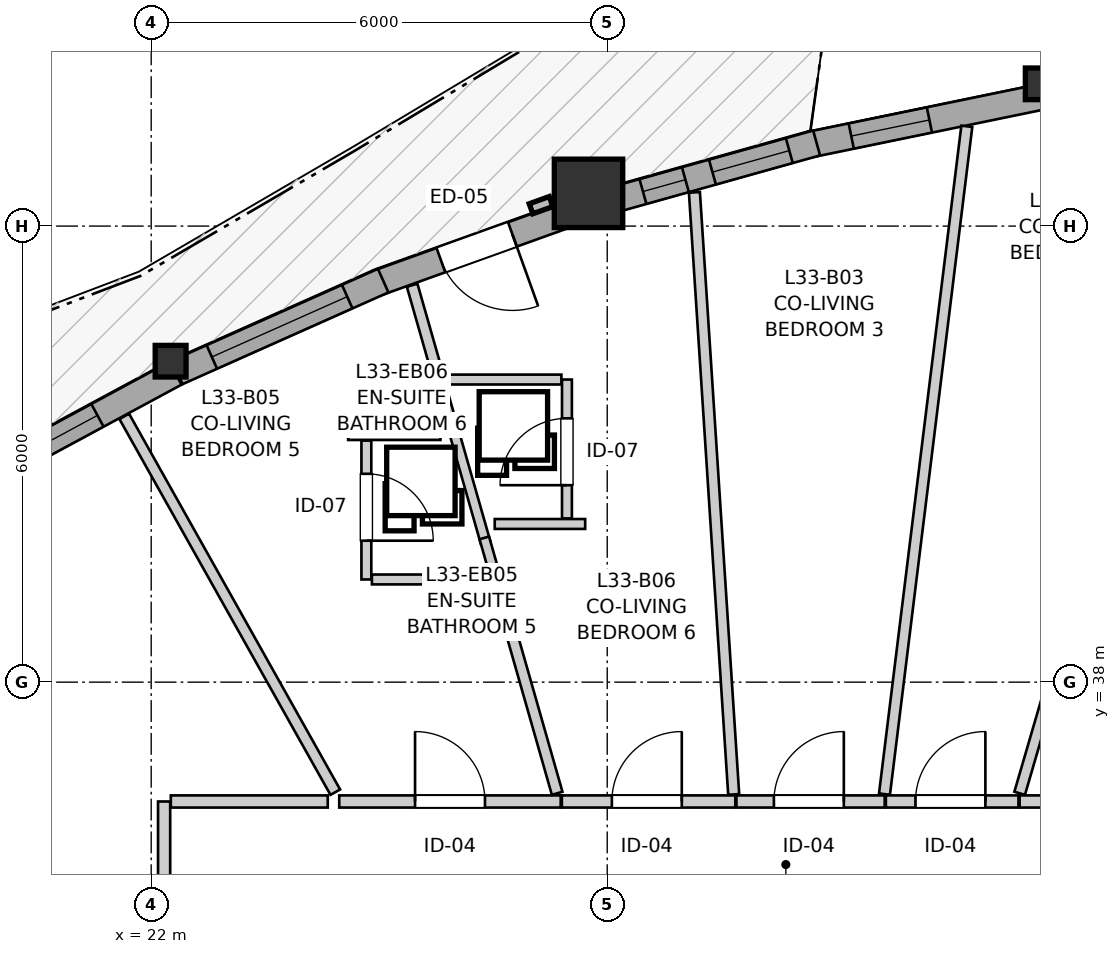
"""IFC4 building model, lengths in metres.
Left out: names, types, materials, properties, quantities, classifications, styles, units other than length and angle.
Written with IfcOpenShell. Run it as: python <this file> out.ifc"""

import sys

from ifc_helpers import new_model, si_unit, direction, frame, frame_2d, origin, origin_2d, place, context, subcontext, project, spatial, rectangle, i_section, extrude, source, transform, mapped, element, fill, save


model = new_model("IFC4")
c1 = context("Model", 3, precision=1e-05, world=origin(), true_north=direction((0.0, 1.0)))
c2 = subcontext(c1, "Body", "Model", "MODEL_VIEW")
j1 = project(units=[si_unit("LENGTHUNIT", "METRE"), si_unit("PLANEANGLEUNIT", "RADIAN")], contexts=[c1])
p1 = place(None, origin())
s1 = spatial("IfcSite", under=j1, at=p1, CompositionType="ELEMENT")
p2 = place(p1, origin())
s2 = spatial("IfcBuilding", under=s1, at=p2, CompositionType="ELEMENT")
p3 = place(p2, frame((0.0, 0.0, 112.0)))
s3 = spatial("IfcBuildingStorey", under=s2, at=p3, CompositionType="ELEMENT", Elevation=112.0)
m1 = source(origin(), c2, "Body", "SweptSolid", [
    extrude(i_section(OverallWidth=0.406, OverallDepth=0.416, WebThickness=0.027, FlangeThickness=0.044, FilletRadius=0.015, at=origin_2d()), origin(), (0.0, 0.0, 1.0), 2.935),
])
p4 = place(p3, frame((33.704, 45.872, 0.0), z_axis=(0.0, 0.0, 1.0), x_axis=(1.0, 0.0, 0.0)))
e1 = element("IfcColumn", 1, at=p4, inside=s3, PredefinedType="PILASTER", context=c2, shape_type="MappedRepresentation", body=[
    mapped(m1, transform((0.0, 0.0, 0.0), x_axis=(1.0, 0.0, 0.0), y_axis=(0.0, 1.0, 0.0), z_axis=(0.0, 0.0, 1.0), scale=1.0)),
])
m2 = source(origin(), c2, "Body", "SweptSolid", [
    extrude(rectangle(XDim=0.9, YDim=0.9, at=origin_2d()), origin(), (0.0, 0.0, 1.0), 2.935),
])
p5 = place(p3, frame((27.754, 44.431, 0.0), z_axis=(0.0, 0.0, 1.0), x_axis=(1.0, 0.0, 0.0)))
e2 = element("IfcColumn", 2, at=p5, inside=s3, PredefinedType="COLUMN", context=c2, shape_type="MappedRepresentation", body=[
    mapped(m2, transform((0.0, 0.0, 0.0), x_axis=(1.0, 0.0, 0.0), y_axis=(0.0, 1.0, 0.0), z_axis=(0.0, 0.0, 1.0), scale=1.0)),
])
p6 = place(p3, frame((22.256, 42.222, 0.0), z_axis=(0.0, 0.0, 1.0), x_axis=(1.0, 0.0, 0.0)))
e3 = element("IfcColumn", 3, at=p6, inside=s3, PredefinedType="PILASTER", context=c2, shape_type="MappedRepresentation", body=[
    mapped(m1, transform((0.0, 0.0, 0.0), x_axis=(1.0, 0.0, 0.0), y_axis=(0.0, 1.0, 0.0), z_axis=(0.0, 0.0, 1.0), scale=1.0)),
])
p7 = place(p3, frame((33.719, 45.701, 0.0), z_axis=(0.0, 0.0, 1.0), x_axis=(-0.979417849231, -0.201843198072, 0.0)))
e4 = element("IfcWall", 4, at=p7, inside=s3, PredefinedType="SOLIDWALL", context=c2, shape_type="SweptSolid", body=[
    extrude(rectangle(XDim=3.113, YDim=0.34, at=frame_2d((1.557, 0.0))), origin(), (0.0, 0.0, 1.0), 2.465),
])
p8 = place(p7, frame((1.511, 0.0, 0.82)))
e5 = element("IfcOpeningElement", 5, at=p8, cuts=e4, PredefinedType="OPENING", context=c2, shape_type="SweptSolid", body=[
    extrude(rectangle(XDim=1.05, YDim=1.45, at=frame_2d((0.525, 0.725))), frame((0.0, 0.18, 0.0), z_axis=(0.0, -1.0, 0.0), x_axis=(1.0, 0.0, 0.0)), (0.0, 0.0, 1.0), 0.36),
])
p9 = place(p3, frame((30.755, 45.094, 0.0), z_axis=(0.0, 0.0, 1.0), x_axis=(-0.963040794714, -0.269355578589, 0.0)))
e6 = element("IfcWall", 6, at=p9, inside=s3, PredefinedType="SOLIDWALL", context=c2, shape_type="SweptSolid", body=[
    extrude(rectangle(XDim=2.839, YDim=0.34, at=frame_2d((1.419, 0.0))), origin(), (0.0, 0.0, 1.0), 2.465),
])
p10 = place(p9, frame((0.373, 0.0, 0.82)))
e7 = element("IfcOpeningElement", 7, at=p10, cuts=e6, PredefinedType="OPENING", context=c2, shape_type="SweptSolid", body=[
    extrude(rectangle(XDim=1.05, YDim=1.45, at=frame_2d((0.525, 0.725))), frame((0.0, 0.18, 0.0), z_axis=(0.0, -1.0, 0.0), x_axis=(1.0, 0.0, 0.0)), (0.0, 0.0, 1.0), 0.36),
])
p11 = place(p9, frame((1.792, 0.0, 0.82)))
e8 = element("IfcOpeningElement", 8, at=p11, cuts=e6, PredefinedType="OPENING", context=c2, shape_type="SweptSolid", body=[
    extrude(rectangle(XDim=0.58, YDim=1.35, at=frame_2d((0.29, 0.675))), frame((0.0, 0.18, 0.0), z_axis=(0.0, -1.0, 0.0), x_axis=(1.0, 0.0, 0.0)), (0.0, 0.0, 1.0), 0.36),
])
p12 = place(p3, frame((27.595, 44.193, 0.0), z_axis=(0.0, 0.0, 1.0), x_axis=(-0.94107471628, -0.338198726163, 0.0)))
e9 = element("IfcWall", 9, at=p12, inside=s3, PredefinedType="SOLIDWALL", context=c2, shape_type="SweptSolid", body=[
    extrude(rectangle(XDim=2.789, YDim=0.34, at=frame_2d((1.395, 0.0))), origin(), (0.0, 0.0, 1.0), 2.465),
])
p13 = place(p12, frame((0.895, 0.0, 0.0)))
e10 = element("IfcOpeningElement", 10, at=p13, cuts=e9, PredefinedType="OPENING", context=c2, shape_type="SweptSolid", body=[
    extrude(rectangle(XDim=1.0, YDim=2.1, at=frame_2d((0.5, 1.05))), frame((0.0, 0.18, 0.0), z_axis=(0.0, -1.0, 0.0), x_axis=(1.0, 0.0, 0.0)), (0.0, 0.0, 1.0), 0.36),
])
p14 = place(p3, frame((25.052, 43.283, 0.0), z_axis=(0.0, 0.0, 1.0), x_axis=(-0.913400340023, -0.407062426227, 0.0)))
e11 = element("IfcWall", 11, at=p14, inside=s3, PredefinedType="SOLIDWALL", context=c2, shape_type="SweptSolid", body=[
    extrude(rectangle(XDim=2.966, YDim=0.34, at=frame_2d((1.483, 0.0))), origin(), (0.0, 0.0, 1.0), 2.465),
])
p15 = place(p14, frame((0.518, 0.0, 0.82)))
e12 = element("IfcOpeningElement", 12, at=p15, cuts=e11, PredefinedType="OPENING", context=c2, shape_type="SweptSolid", body=[
    extrude(rectangle(XDim=1.95, YDim=1.4, at=frame_2d((0.975, 0.7))), frame((0.0, 0.18, 0.0), z_axis=(0.0, -1.0, 0.0), x_axis=(1.0, 0.0, 0.0)), (0.0, 0.0, 1.0), 0.36),
])
p16 = place(p3, frame((22.319, 42.063, 0.0), z_axis=(0.0, 0.0, 1.0), x_axis=(-0.880050731383, -0.4748796797, 0.0)))
e13 = element("IfcWall", 13, at=p16, inside=s3, PredefinedType="SOLIDWALL", context=c2, shape_type="SweptSolid", body=[
    extrude(rectangle(XDim=2.949, YDim=0.34, at=frame_2d((1.475, 0.0))), origin(), (0.0, 0.0, 1.0), 2.465),
])
p17 = place(p16, frame((1.166, 0.0, 0.82)))
e14 = element("IfcOpeningElement", 14, at=p17, cuts=e13, PredefinedType="OPENING", context=c2, shape_type="SweptSolid", body=[
    extrude(rectangle(XDim=1.4, YDim=1.35, at=frame_2d((0.7, 0.675))), frame((0.0, 0.18, 0.0), z_axis=(0.0, -1.0, 0.0), x_axis=(1.0, 0.0, 0.0)), (0.0, 0.0, 1.0), 0.36),
])
p18 = place(p3, frame((22.17, 29.865, 0.0), z_axis=(0.0, 0.0, 1.0), x_axis=(0.0, 1.0, 0.0)))
e15 = element("IfcWall", 15, at=p18, inside=s3, PredefinedType="PARTITIONING", context=c2, shape_type="SweptSolid", body=[
    extrude(rectangle(XDim=6.565, YDim=0.16, at=frame_2d((3.282, 0.0))), origin(), (0.0, 0.0, 1.0), 2.935),
])
p19 = place(p18, frame((2.811, 0.0, 0.0)))
e16 = element("IfcOpeningElement", 16, at=p19, cuts=e15, PredefinedType="OPENING", context=c2, shape_type="SweptSolid", body=[
    extrude(rectangle(XDim=0.96, YDim=2.1, at=frame_2d((0.48, 1.05))), frame((0.0, 0.09, 0.0), z_axis=(0.0, -1.0, 0.0), x_axis=(1.0, 0.0, 0.0)), (0.0, 0.0, 1.0), 0.18),
])
p20 = place(p3, frame((24.474, 36.43, 0.0), z_axis=(0.0, 0.0, 1.0), x_axis=(1.0, 0.0, 0.0)))
e17 = element("IfcWall", 17, at=p20, inside=s3, PredefinedType="PARTITIONING", context=c2, shape_type="SweptSolid", body=[
    extrude(rectangle(XDim=2.914, YDim=0.16, at=frame_2d((1.457, 0.0))), origin(), (0.0, 0.0, 1.0), 2.573),
])
p21 = place(p20, frame((0.998, 0.0, 0.0)))
e18 = element("IfcOpeningElement", 18, at=p21, cuts=e17, PredefinedType="OPENING", context=c2, shape_type="SweptSolid", body=[
    extrude(rectangle(XDim=0.92, YDim=2.1, at=frame_2d((0.46, 1.05))), frame((0.0, 0.09, 0.0), z_axis=(0.0, -1.0, 0.0), x_axis=(1.0, 0.0, 0.0)), (0.0, 0.0, 1.0), 0.18),
])
p22 = place(p3, frame((27.403, 36.43, 0.0), z_axis=(0.0, 0.0, 1.0), x_axis=(1.0, 0.0, 0.0)))
e19 = element("IfcWall", 19, at=p22, inside=s3, PredefinedType="PARTITIONING", context=c2, shape_type="SweptSolid", body=[
    extrude(rectangle(XDim=2.282, YDim=0.16, at=frame_2d((1.141, 0.0))), origin(), (0.0, 0.0, 1.0), 2.935),
])
p23 = place(p22, frame((0.658, 0.0, 0.0)))
e20 = element("IfcOpeningElement", 20, at=p23, cuts=e19, PredefinedType="OPENING", context=c2, shape_type="SweptSolid", body=[
    extrude(rectangle(XDim=0.92, YDim=2.1, at=frame_2d((0.46, 1.05))), frame((0.0, 0.09, 0.0), z_axis=(0.0, -1.0, 0.0), x_axis=(1.0, 0.0, 0.0)), (0.0, 0.0, 1.0), 0.18),
])
p24 = place(p3, frame((29.7, 36.43, 0.0), z_axis=(0.0, 0.0, 1.0), x_axis=(1.0, 0.0, 0.0)))
e21 = element("IfcWall", 21, at=p24, inside=s3, PredefinedType="PARTITIONING", context=c2, shape_type="SweptSolid", body=[
    extrude(rectangle(XDim=1.951, YDim=0.16, at=frame_2d((0.976, 0.0))), origin(), (0.0, 0.0, 1.0), 2.935),
])
p25 = place(p24, frame((0.493, 0.0, 0.0)))
e22 = element("IfcOpeningElement", 22, at=p25, cuts=e21, PredefinedType="OPENING", context=c2, shape_type="SweptSolid", body=[
    extrude(rectangle(XDim=0.92, YDim=2.1, at=frame_2d((0.46, 1.05))), frame((0.0, 0.09, 0.0), z_axis=(0.0, -1.0, 0.0), x_axis=(1.0, 0.0, 0.0)), (0.0, 0.0, 1.0), 0.18),
])
p26 = place(p3, frame((24.831, 41.178, 0.0), z_axis=(0.0, 0.0, 1.0), x_axis=(0.0, -1.0, 0.0)))
e23 = element("IfcWall", 23, at=p26, inside=s3, PredefinedType="PARTITIONING", context=c2, shape_type="SweptSolid", body=[
    extrude(rectangle(XDim=1.827, YDim=0.13, at=frame_2d((0.914, 0.0))), origin(), (0.0, 0.0, 1.0), 2.935),
])
p27 = place(p26, frame((0.437, 0.0, 0.0)))
e24 = element("IfcOpeningElement", 24, at=p27, cuts=e23, PredefinedType="OPENING", context=c2, shape_type="SweptSolid", body=[
    extrude(rectangle(XDim=0.88, YDim=2.05, at=frame_2d((0.44, 1.025))), frame((0.0, 0.075, 0.0), z_axis=(0.0, -1.0, 0.0), x_axis=(1.0, 0.0, 0.0)), (0.0, 0.0, 1.0), 0.15),
])
p28 = place(p3, frame((27.47, 40.154, 0.0), z_axis=(0.0, 0.0, 1.0), x_axis=(0.0, 1.0, 0.0)))
e25 = element("IfcWall", 25, at=p28, inside=s3, PredefinedType="PARTITIONING", context=c2, shape_type="SweptSolid", body=[
    extrude(rectangle(XDim=1.827, YDim=0.13, at=frame_2d((0.914, 0.0))), origin(), (0.0, 0.0, 1.0), 2.935),
])
p29 = place(p28, frame((0.437, 0.0, 0.0)))
e26 = element("IfcOpeningElement", 26, at=p29, cuts=e25, PredefinedType="OPENING", context=c2, shape_type="SweptSolid", body=[
    extrude(rectangle(XDim=0.88, YDim=2.05, at=frame_2d((0.44, 1.025))), frame((0.0, 0.075, 0.0), z_axis=(0.0, -1.0, 0.0), x_axis=(1.0, 0.0, 0.0)), (0.0, 0.0, 1.0), 0.15),
])
p30 = place(p3, frame((31.666, 36.43, 0.0), z_axis=(0.0, 0.0, 1.0), x_axis=(1.0, 0.0, 0.0)))
e27 = element("IfcWall", 27, at=p30, inside=s3, PredefinedType="PARTITIONING", context=c2, shape_type="SweptSolid", body=[
    extrude(rectangle(XDim=1.745, YDim=0.16, at=frame_2d((0.873, 0.0))), origin(), (0.0, 0.0, 1.0), 2.935),
])
p31 = place(p30, frame((0.389, 0.0, 0.0)))
e28 = element("IfcOpeningElement", 28, at=p31, cuts=e27, PredefinedType="OPENING", context=c2, shape_type="SweptSolid", body=[
    extrude(rectangle(XDim=0.92, YDim=2.1, at=frame_2d((0.46, 1.05))), frame((0.0, 0.09, 0.0), z_axis=(0.0, -1.0, 0.0), x_axis=(1.0, 0.0, 0.0)), (0.0, 0.0, 1.0), 0.18),
])
p32 = place(p3, frame((33.426, 36.43, 0.0), z_axis=(0.0, 0.0, 1.0), x_axis=(1.0, 0.0, 0.0)))
e29 = element("IfcWall", 29, at=p32, inside=s3, PredefinedType="PARTITIONING", context=c2, shape_type="SweptSolid", body=[
    extrude(rectangle(XDim=1.68, YDim=0.16, at=frame_2d((0.84, 0.0))), origin(), (0.0, 0.0, 1.0), 2.935),
])
p33 = place(p32, frame((0.38, 0.0, 0.0)))
e30 = element("IfcOpeningElement", 30, at=p33, cuts=e29, PredefinedType="OPENING", context=c2, shape_type="SweptSolid", body=[
    extrude(rectangle(XDim=0.92, YDim=2.1, at=frame_2d((0.46, 1.05))), frame((0.0, 0.09, 0.0), z_axis=(0.0, -1.0, 0.0), x_axis=(1.0, 0.0, 0.0)), (0.0, 0.0, 1.0), 0.18),
])
p34 = place(p3, frame((33.427, 36.538, 0.0), z_axis=(0.0, 0.0, 1.0), x_axis=(0.280326379037, 0.959904745908, 0.0)))
e31 = element("IfcWall", 31, at=p34, inside=s3, PredefinedType="PARTITIONING", context=c2, shape_type="SweptSolid", body=[
    extrude(rectangle(XDim=10.082, YDim=0.145, at=frame_2d((5.041, 0.0))), origin(), (0.0, 0.0, 1.0), 2.935),
])
p35 = place(p3, frame((31.648, 36.527, 0.0), z_axis=(0.0, 0.0, 1.0), x_axis=(0.122371290087, 0.992484391496, 0.0)))
e32 = element("IfcWall", 32, at=p35, inside=s3, PredefinedType="PARTITIONING", context=c2, shape_type="SweptSolid", body=[
    extrude(rectangle(XDim=8.852, YDim=0.145, at=frame_2d((4.426, 0.0))), origin(), (0.0, 0.0, 1.0), 2.935),
])
p36 = place(p3, frame((29.147, 44.444, 0.0), z_axis=(0.0, 0.0, 1.0), x_axis=(0.065112427166, -0.997877934333, 0.0)))
e33 = element("IfcWall", 33, at=p36, inside=s3, PredefinedType="PARTITIONING", context=c2, shape_type="SweptSolid", body=[
    extrude(rectangle(XDim=7.938, YDim=0.145, at=frame_2d((3.969, 0.0))), origin(), (0.0, 0.0, 1.0), 2.935),
])
p37 = place(p3, frame((21.645, 41.497, 0.0), z_axis=(0.0, 0.0, 1.0), x_axis=(0.489699005063, -0.871891555436, 0.0)))
e34 = element("IfcWall", 34, at=p37, inside=s3, PredefinedType="PARTITIONING", context=c2, shape_type="SweptSolid", body=[
    extrude(rectangle(XDim=5.671, YDim=0.145, at=frame_2d((2.835, 0.0))), origin(), (0.0, 0.0, 1.0), 2.935),
])
p38 = place(p3, frame((26.539, 39.351, 0.0), z_axis=(0.0, 0.0, 1.0), x_axis=(0.274214096408, -0.961668669205, 0.0)))
e35 = element("IfcWall", 35, at=p38, inside=s3, PredefinedType="PARTITIONING", context=c2, shape_type="SweptSolid", body=[
    extrude(rectangle(XDim=2.926, YDim=0.145, at=frame_2d((1.463, 0.0))), origin(), (0.0, 0.0, 1.0), 2.935),
])
p39 = place(p3, frame((22.258, 36.43, 0.0), z_axis=(0.0, 0.0, 1.0), x_axis=(1.0, 0.0, 0.0)))
e36 = element("IfcWall", 36, at=p39, inside=s3, PredefinedType="PARTITIONING", context=c2, shape_type="SweptSolid", body=[
    extrude(rectangle(XDim=2.065, YDim=0.16, at=frame_2d((1.032, 0.0))), origin(), (0.0, 0.0, 1.0), 2.935),
])
p40 = place(p3, frame((24.904, 39.351, 0.0), z_axis=(0.0, 0.0, 1.0), x_axis=(1.0, 0.0, 0.0)))
e37 = element("IfcWall", 37, at=p40, inside=s3, PredefinedType="PARTITIONING", context=c2, shape_type="SweptSolid", body=[
    extrude(rectangle(XDim=1.533, YDim=0.13, at=frame_2d((0.767, 0.0))), origin(), (0.0, 0.0, 1.0), 2.935),
])
p41 = place(p3, frame((25.882, 41.981, 0.0), z_axis=(0.0, 0.0, 1.0), x_axis=(1.0, 0.0, 0.0)))
e38 = element("IfcWall", 38, at=p41, inside=s3, PredefinedType="PARTITIONING", context=c2, shape_type="SweptSolid", body=[
    extrude(rectangle(XDim=1.515, YDim=0.13, at=frame_2d((0.757, 0.0))), origin(), (0.0, 0.0, 1.0), 2.935),
])
p42 = place(p3, frame((25.433, 43.222, 0.0), z_axis=(0.0, 0.0, 1.0), x_axis=(0.274641170969, -0.961546788882, 0.0)))
e39 = element("IfcWall", 39, at=p42, inside=s3, PredefinedType="PARTITIONING", context=c2, shape_type="SweptSolid", body=[
    extrude(rectangle(XDim=1.21, YDim=0.145, at=frame_2d((0.605, 0.0))), origin(), (0.0, 0.0, 1.0), 2.935),
])
p43 = place(p3, frame((25.93, 41.482, 0.0), z_axis=(0.0, 0.0, 1.0), x_axis=(0.274344452215, -0.961631489469, 0.0)))
e40 = element("IfcWall", 40, at=p43, inside=s3, PredefinedType="PARTITIONING", context=c2, shape_type="SweptSolid", body=[
    extrude(rectangle(XDim=1.712, YDim=0.13, at=frame_2d((0.856, 0.0))), origin(), (0.0, 0.0, 1.0), 2.935),
])
p44 = place(p3, frame((24.591, 41.251, 0.0), z_axis=(0.0, 0.0, 1.0), x_axis=(1.0, 0.0, 0.0)))
e41 = element("IfcWall", 41, at=p44, inside=s3, PredefinedType="PARTITIONING", context=c2, shape_type="SweptSolid", body=[
    extrude(rectangle(XDim=1.215, YDim=0.13, at=frame_2d((0.607, 0.0))), origin(), (0.0, 0.0, 1.0), 2.935),
])
p45 = place(p3, frame((26.52, 40.081, 0.0), z_axis=(0.0, 0.0, 1.0), x_axis=(1.0, 0.0, 0.0)))
e42 = element("IfcWall", 42, at=p45, inside=s3, PredefinedType="PARTITIONING", context=c2, shape_type="SweptSolid", body=[
    extrude(rectangle(XDim=1.19, YDim=0.13, at=frame_2d((0.595, 0.0))), origin(), (0.0, 0.0, 1.0), 2.935),
])
p46 = place(p3, frame((26.383, 39.898, 0.0), z_axis=(0.0, 0.0, 1.0), x_axis=(0.274982401426, -0.961449259663, 0.0)))
e43 = element("IfcWall", 43, at=p46, inside=s3, PredefinedType="PARTITIONING", context=c2, shape_type="SweptSolid", body=[
    extrude(rectangle(XDim=0.617, YDim=0.13, at=frame_2d((0.309, 0.0))), origin(), (0.0, 0.0, 1.0), 2.935),
])
p47 = place(p3, frame((25.755, 42.099, 0.0), z_axis=(0.0, 0.0, 1.0), x_axis=(0.273881956808, -0.961763314821, 0.0)))
e44 = element("IfcWall", 44, at=p47, inside=s3, PredefinedType="PARTITIONING", context=c2, shape_type="SweptSolid", body=[
    extrude(rectangle(XDim=0.692, YDim=0.13, at=frame_2d((0.346, 0.0))), origin(), (0.0, 0.0, 1.0), 2.935),
])
m3 = source(origin(), c2, "Body", "SweptSolid", [
    extrude(rectangle(XDim=1.05, YDim=1.45, at=frame_2d((0.525, 0.725))), frame((0.0, 0.03, 0.0), z_axis=(0.0, -1.0, 0.0), x_axis=(1.0, 0.0, 0.0)), (0.0, 0.0, 1.0), 0.06),
])
p48 = place(p8, origin())
e45 = element("IfcWindow", 45, at=p48, inside=s3, PartitioningType="SINGLE_PANEL", PredefinedType="WINDOW", context=c2, shape_type="MappedRepresentation", body=[
    mapped(m3, transform((0.0, 0.0, 0.0), x_axis=(1.0, 0.0, 0.0), y_axis=(0.0, 1.0, 0.0), z_axis=(0.0, 0.0, 1.0), scale=1.0)),
])
fill(e5, e45)
p49 = place(p10, origin())
e46 = element("IfcWindow", 46, at=p49, inside=s3, PartitioningType="SINGLE_PANEL", PredefinedType="WINDOW", context=c2, shape_type="MappedRepresentation", body=[
    mapped(m3, transform((0.0, 0.0, 0.0), x_axis=(1.0, 0.0, 0.0), y_axis=(0.0, 1.0, 0.0), z_axis=(0.0, 0.0, 1.0), scale=1.0)),
])
fill(e7, e46)
m4 = source(origin(), c2, "Body", "SweptSolid", [
    extrude(rectangle(XDim=0.58, YDim=1.35, at=frame_2d((0.29, 0.675))), frame((0.0, 0.03, 0.0), z_axis=(0.0, -1.0, 0.0), x_axis=(1.0, 0.0, 0.0)), (0.0, 0.0, 1.0), 0.06),
])
p50 = place(p11, origin())
e47 = element("IfcWindow", 47, at=p50, inside=s3, PartitioningType="SINGLE_PANEL", PredefinedType="WINDOW", context=c2, shape_type="MappedRepresentation", body=[
    mapped(m4, transform((0.0, 0.0, 0.0), x_axis=(1.0, 0.0, 0.0), y_axis=(0.0, 1.0, 0.0), z_axis=(0.0, 0.0, 1.0), scale=1.0)),
])
fill(e8, e47)
m5 = source(origin(), c2, "Body", "SweptSolid", [
    extrude(rectangle(XDim=1.95, YDim=1.4, at=frame_2d((0.975, 0.7))), frame((0.0, 0.03, 0.0), z_axis=(0.0, -1.0, 0.0), x_axis=(1.0, 0.0, 0.0)), (0.0, 0.0, 1.0), 0.06),
])
p51 = place(p15, origin())
e48 = element("IfcWindow", 48, at=p51, inside=s3, PartitioningType="SINGLE_PANEL", PredefinedType="WINDOW", context=c2, shape_type="MappedRepresentation", body=[
    mapped(m5, transform((0.0, 0.0, 0.0), x_axis=(1.0, 0.0, 0.0), y_axis=(0.0, 1.0, 0.0), z_axis=(0.0, 0.0, 1.0), scale=1.0)),
])
fill(e12, e48)
m6 = source(origin(), c2, "Body", "SweptSolid", [
    extrude(rectangle(XDim=1.4, YDim=1.35, at=frame_2d((0.7, 0.675))), frame((0.0, 0.03, 0.0), z_axis=(0.0, -1.0, 0.0), x_axis=(1.0, 0.0, 0.0)), (0.0, 0.0, 1.0), 0.06),
])
p52 = place(p17, origin())
e49 = element("IfcWindow", 49, at=p52, inside=s3, PartitioningType="SINGLE_PANEL", PredefinedType="WINDOW", context=c2, shape_type="MappedRepresentation", body=[
    mapped(m6, transform((0.0, 0.0, 0.0), x_axis=(1.0, 0.0, 0.0), y_axis=(0.0, 1.0, 0.0), z_axis=(0.0, 0.0, 1.0), scale=1.0)),
])
fill(e14, e49)
m7 = source(origin(), c2, "Body", "SweptSolid", [
    extrude(rectangle(XDim=1.0, YDim=2.1, at=frame_2d((0.5, 1.05))), frame((0.0, 0.025, 0.0), z_axis=(0.0, -1.0, 0.0), x_axis=(1.0, 0.0, 0.0)), (0.0, 0.0, 1.0), 0.05),
])
p53 = place(p13, origin())
e50 = element("IfcDoor", 50, at=p53, inside=s3, OperationType="SINGLE_SWING_LEFT", PredefinedType="DOOR", context=c2, shape_type="MappedRepresentation", body=[
    mapped(m7, transform((0.0, 0.0, 0.0), x_axis=(1.0, 0.0, 0.0), y_axis=(0.0, 1.0, 0.0), z_axis=(0.0, 0.0, 1.0), scale=1.0)),
])
fill(e10, e50)
m8 = source(origin(), c2, "Body", "SweptSolid", [
    extrude(rectangle(XDim=0.92, YDim=2.1, at=frame_2d((0.46, 1.05))), frame((0.0, 0.025, 0.0), z_axis=(0.0, -1.0, 0.0), x_axis=(1.0, 0.0, 0.0)), (0.0, 0.0, 1.0), 0.05),
])
p54 = place(p21, origin())
e51 = element("IfcDoor", 51, at=p54, inside=s3, OperationType="SINGLE_SWING_LEFT", PredefinedType="DOOR", context=c2, shape_type="MappedRepresentation", body=[
    mapped(m8, transform((0.0, 0.0, 0.0), x_axis=(1.0, 0.0, 0.0), y_axis=(0.0, 1.0, 0.0), z_axis=(0.0, 0.0, 1.0), scale=1.0)),
])
fill(e18, e51)
p55 = place(p23, origin())
e52 = element("IfcDoor", 52, at=p55, inside=s3, OperationType="SINGLE_SWING_RIGHT", PredefinedType="DOOR", context=c2, shape_type="MappedRepresentation", body=[
    mapped(m8, transform((0.0, 0.0, 0.0), x_axis=(1.0, 0.0, 0.0), y_axis=(0.0, 1.0, 0.0), z_axis=(0.0, 0.0, 1.0), scale=1.0)),
])
fill(e20, e52)
p56 = place(p25, origin())
e53 = element("IfcDoor", 53, at=p56, inside=s3, OperationType="SINGLE_SWING_RIGHT", PredefinedType="DOOR", context=c2, shape_type="MappedRepresentation", body=[
    mapped(m8, transform((0.0, 0.0, 0.0), x_axis=(1.0, 0.0, 0.0), y_axis=(0.0, 1.0, 0.0), z_axis=(0.0, 0.0, 1.0), scale=1.0)),
])
fill(e22, e53)
m9 = source(origin(), c2, "Body", "SweptSolid", [
    extrude(rectangle(XDim=0.88, YDim=2.05, at=frame_2d((0.44, 1.025))), frame((0.0, 0.025, 0.0), z_axis=(0.0, -1.0, 0.0), x_axis=(1.0, 0.0, 0.0)), (0.0, 0.0, 1.0), 0.05),
])
p57 = place(p27, origin())
e54 = element("IfcDoor", 54, at=p57, inside=s3, OperationType="SINGLE_SWING_RIGHT", PredefinedType="DOOR", context=c2, shape_type="MappedRepresentation", body=[
    mapped(m9, transform((0.0, 0.0, 0.0), x_axis=(1.0, 0.0, 0.0), y_axis=(0.0, 1.0, 0.0), z_axis=(0.0, 0.0, 1.0), scale=1.0)),
])
fill(e24, e54)
p58 = place(p29, origin())
e55 = element("IfcDoor", 55, at=p58, inside=s3, OperationType="SINGLE_SWING_LEFT", PredefinedType="DOOR", context=c2, shape_type="MappedRepresentation", body=[
    mapped(m9, transform((0.0, 0.0, 0.0), x_axis=(1.0, 0.0, 0.0), y_axis=(0.0, 1.0, 0.0), z_axis=(0.0, 0.0, 1.0), scale=1.0)),
])
fill(e26, e55)
p59 = place(p31, origin())
e56 = element("IfcDoor", 56, at=p59, inside=s3, OperationType="SINGLE_SWING_RIGHT", PredefinedType="DOOR", context=c2, shape_type="MappedRepresentation", body=[
    mapped(m8, transform((0.0, 0.0, 0.0), x_axis=(1.0, 0.0, 0.0), y_axis=(0.0, 1.0, 0.0), z_axis=(0.0, 0.0, 1.0), scale=1.0)),
])
fill(e28, e56)
save(model, sys.argv[1])
